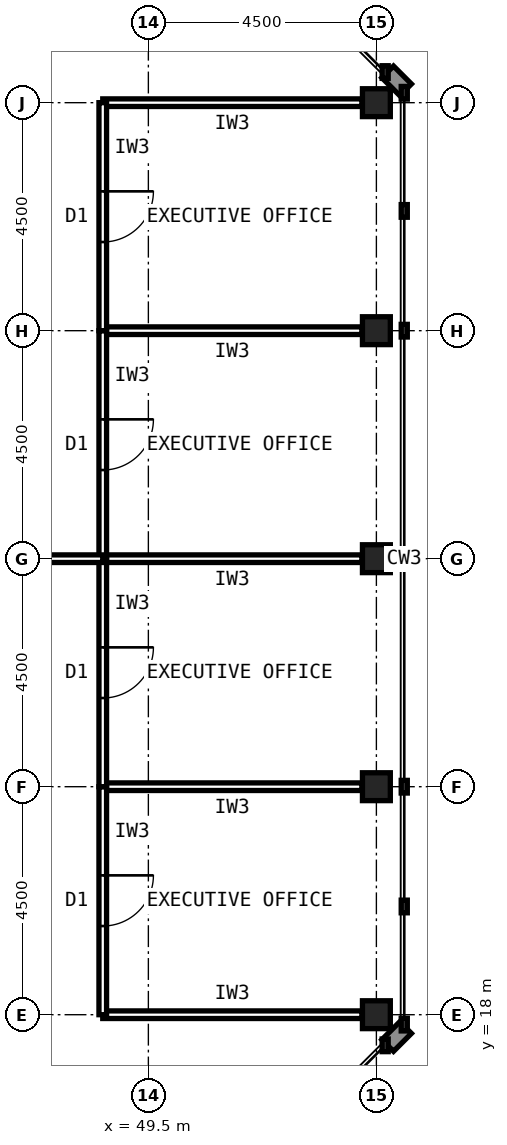
"""IFC4 building model, lengths in metres.
Left out: names, types, materials, properties, quantities, classifications, styles, units other than length and angle.
Written with IfcOpenShell. Run it as: python <this file> out.ifc"""

import sys

from ifc_helpers import new_model, si_unit, direction, frame, frame_2d, origin, origin_2d, place, context, subcontext, project, spatial, rectangle, hollow_rectangle, extrude, element, fill, save


model = new_model("IFC4")
c1 = context("Model", 3, precision=1e-05, world=origin(), true_north=direction((0.0, 1.0)))
c2 = subcontext(c1, "Body", "Model", "MODEL_VIEW")
j1 = project(units=[si_unit("LENGTHUNIT", "METRE"), si_unit("PLANEANGLEUNIT", "RADIAN")], contexts=[c1])
p1 = place(None, origin())
s1 = spatial("IfcSite", under=j1, at=p1, CompositionType="ELEMENT")
p2 = place(p1, origin())
s2 = spatial("IfcBuilding", under=s1, at=p2, CompositionType="ELEMENT")
p3 = place(p2, frame((0.0, 0.0, 294.6)))
s3 = spatial("IfcBuildingStorey", under=s2, at=p3, CompositionType="ELEMENT", Elevation=294.6)
for number, where, z_axis, x_axis in (
    (1, (54.0, 18.0, 0.0), (0.0, 0.0, 1.0), (1.0, 0.0, 0.0)),
    (2, (54.0, 22.5, 0.0), (0.0, 0.0, 1.0), (1.0, 0.0, 0.0)),
    (3, (54.0, 27.0, 0.0), (0.0, 0.0, 1.0), (1.0, 0.0, 0.0)),
    (4, (54.0, 31.5, 0.0), (0.0, 0.0, 1.0), (1.0, 0.0, 0.0)),
    (5, (54.0, 36.0, 0.0), (0.0, 0.0, 1.0), (1.0, 0.0, 0.0)),
):
    element("IfcColumn", number, at=place(p3, frame(where, z_axis=z_axis, x_axis=x_axis)), inside=s3, PredefinedType="COLUMN", context=c2, shape_type="SweptSolid", body=[
        extrude(hollow_rectangle(XDim=0.55, YDim=0.55, WallThickness=0.025, at=origin_2d()), origin(), (0.0, 0.0, 1.0), 4.0),
    ])
for number, where, z_axis, x_axis in (
    (6, (48.6, 18.0, 0.0), (0.0, 0.0, 1.0), (1.0, 0.0, 0.0)),
    (7, (53.715, 22.5, 0.0), (0.0, 0.0, 1.0), (-1.0, 0.0, 0.0)),
):
    element("IfcWall", number, at=place(p3, frame(where, z_axis=z_axis, x_axis=x_axis)), inside=s3, PredefinedType="PARTITIONING", context=c2, shape_type="SweptSolid", body=[
        extrude(rectangle(XDim=5.115, YDim=0.15, at=frame_2d((2.558, 0.0))), origin(), (0.0, 0.0, 1.0), 2.989),
    ])
p4 = place(p3, frame((48.6, 22.5, 0.0), z_axis=(0.0, 0.0, 1.0), x_axis=(0.0, -1.0, 0.0)))
e8 = element("IfcWall", 8, at=p4, inside=s3, PredefinedType="PARTITIONING", context=c2, shape_type="SweptSolid", body=[
    extrude(rectangle(XDim=4.5, YDim=0.15, at=frame_2d((2.25, 0.0))), origin(), (0.0, 0.0, 1.0), 3.84),
])
p5 = place(p4, frame((1.75, 0.0, 0.0)))
e9 = element("IfcOpeningElement", 9, at=p5, cuts=e8, PredefinedType="OPENING", context=c2, shape_type="SweptSolid", body=[
    extrude(rectangle(XDim=1.0, YDim=2.1, at=frame_2d((0.5, 1.05))), frame((0.0, 0.085, 0.0), z_axis=(0.0, -1.0, 0.0), x_axis=(1.0, 0.0, 0.0)), (0.0, 0.0, 1.0), 0.17),
])
p6 = place(p3, frame((53.715, 27.0, 0.0), z_axis=(0.0, 0.0, 1.0), x_axis=(-1.0, 0.0, 0.0)))
e10 = element("IfcWall", 10, at=p6, inside=s3, PredefinedType="PARTITIONING", context=c2, shape_type="SweptSolid", body=[
    extrude(rectangle(XDim=5.115, YDim=0.15, at=frame_2d((2.558, 0.0))), origin(), (0.0, 0.0, 1.0), 2.989),
])
p7 = place(p3, frame((48.6, 27.0, 0.0), z_axis=(0.0, 0.0, 1.0), x_axis=(0.0, -1.0, 0.0)))
e11 = element("IfcWall", 11, at=p7, inside=s3, PredefinedType="PARTITIONING", context=c2, shape_type="SweptSolid", body=[
    extrude(rectangle(XDim=4.5, YDim=0.15, at=frame_2d((2.25, 0.0))), origin(), (0.0, 0.0, 1.0), 3.84),
])
p8 = place(p7, frame((1.75, 0.0, 0.0)))
e12 = element("IfcOpeningElement", 12, at=p8, cuts=e11, PredefinedType="OPENING", context=c2, shape_type="SweptSolid", body=[
    extrude(rectangle(XDim=1.0, YDim=2.1, at=frame_2d((0.5, 1.05))), frame((0.0, 0.085, 0.0), z_axis=(0.0, -1.0, 0.0), x_axis=(1.0, 0.0, 0.0)), (0.0, 0.0, 1.0), 0.17),
])
p9 = place(p3, frame((53.715, 31.5, 0.0), z_axis=(0.0, 0.0, 1.0), x_axis=(-1.0, 0.0, 0.0)))
e13 = element("IfcWall", 13, at=p9, inside=s3, PredefinedType="PARTITIONING", context=c2, shape_type="SweptSolid", body=[
    extrude(rectangle(XDim=5.115, YDim=0.15, at=frame_2d((2.558, 0.0))), origin(), (0.0, 0.0, 1.0), 2.989),
])
p10 = place(p3, frame((48.6, 31.5, 0.0), z_axis=(0.0, 0.0, 1.0), x_axis=(0.0, -1.0, 0.0)))
e14 = element("IfcWall", 14, at=p10, inside=s3, PredefinedType="PARTITIONING", context=c2, shape_type="SweptSolid", body=[
    extrude(rectangle(XDim=4.5, YDim=0.15, at=frame_2d((2.25, 0.0))), origin(), (0.0, 0.0, 1.0), 3.84),
])
p11 = place(p10, frame((1.75, 0.0, 0.0)))
e15 = element("IfcOpeningElement", 15, at=p11, cuts=e14, PredefinedType="OPENING", context=c2, shape_type="SweptSolid", body=[
    extrude(rectangle(XDim=1.0, YDim=2.1, at=frame_2d((0.5, 1.05))), frame((0.0, 0.085, 0.0), z_axis=(0.0, -1.0, 0.0), x_axis=(1.0, 0.0, 0.0)), (0.0, 0.0, 1.0), 0.17),
])
p12 = place(p3, frame((53.715, 36.0, 0.0), z_axis=(0.0, 0.0, 1.0), x_axis=(-1.0, 0.0, 0.0)))
e16 = element("IfcWall", 16, at=p12, inside=s3, PredefinedType="PARTITIONING", context=c2, shape_type="SweptSolid", body=[
    extrude(rectangle(XDim=5.115, YDim=0.15, at=frame_2d((2.558, 0.0))), origin(), (0.0, 0.0, 1.0), 2.989),
])
p13 = place(p3, frame((48.6, 36.0, 0.0), z_axis=(0.0, 0.0, 1.0), x_axis=(0.0, -1.0, 0.0)))
e17 = element("IfcWall", 17, at=p13, inside=s3, PredefinedType="PARTITIONING", context=c2, shape_type="SweptSolid", body=[
    extrude(rectangle(XDim=4.5, YDim=0.15, at=frame_2d((2.25, 0.0))), origin(), (0.0, 0.0, 1.0), 3.84),
])
p14 = place(p13, frame((1.75, 0.0, 0.0)))
e18 = element("IfcOpeningElement", 18, at=p14, cuts=e17, PredefinedType="OPENING", context=c2, shape_type="SweptSolid", body=[
    extrude(rectangle(XDim=1.0, YDim=2.1, at=frame_2d((0.5, 1.05))), frame((0.0, 0.085, 0.0), z_axis=(0.0, -1.0, 0.0), x_axis=(1.0, 0.0, 0.0)), (0.0, 0.0, 1.0), 0.17),
])
p15 = place(p3, frame((42.3, 27.0, 0.0), z_axis=(0.0, 0.0, 1.0), x_axis=(1.0, 0.0, 0.0)))
e19 = element("IfcWall", 19, at=p15, inside=s3, PredefinedType="PARTITIONING", context=c2, shape_type="SweptSolid", body=[
    extrude(rectangle(XDim=6.3, YDim=0.15, at=frame_2d((3.15, 0.0))), origin(), (0.0, 0.0, 1.0), 2.989),
])
p16 = place(p15, frame((2.65, 0.0, 0.0)))
e20 = element("IfcOpeningElement", 20, at=p16, cuts=e19, PredefinedType="OPENING", context=c2, shape_type="SweptSolid", body=[
    extrude(rectangle(XDim=1.0, YDim=2.1, at=frame_2d((0.5, 1.05))), frame((0.0, 0.085, 0.0), z_axis=(0.0, -1.0, 0.0), x_axis=(1.0, 0.0, 0.0)), (0.0, 0.0, 1.0), 0.17),
])
p17 = place(p5, origin())
e21 = element("IfcDoor", 21, at=p17, inside=s3, OperationType="SINGLE_SWING_LEFT", PredefinedType="DOOR", context=c2, shape_type="SweptSolid", body=[
    extrude(rectangle(XDim=1.0, YDim=2.1, at=frame_2d((0.5, 1.05))), frame((0.0, 0.025, 0.0), z_axis=(0.0, -1.0, 0.0), x_axis=(1.0, 0.0, 0.0)), (0.0, 0.0, 1.0), 0.05),
])
fill(e9, e21)
p18 = place(p8, origin())
e22 = element("IfcDoor", 22, at=p18, inside=s3, OperationType="SINGLE_SWING_LEFT", PredefinedType="DOOR", context=c2, shape_type="SweptSolid", body=[
    extrude(rectangle(XDim=1.0, YDim=2.1, at=frame_2d((0.5, 1.05))), frame((0.0, 0.025, 0.0), z_axis=(0.0, -1.0, 0.0), x_axis=(1.0, 0.0, 0.0)), (0.0, 0.0, 1.0), 0.05),
])
fill(e12, e22)
p19 = place(p11, origin())
e23 = element("IfcDoor", 23, at=p19, inside=s3, OperationType="SINGLE_SWING_LEFT", PredefinedType="DOOR", context=c2, shape_type="SweptSolid", body=[
    extrude(rectangle(XDim=1.0, YDim=2.1, at=frame_2d((0.5, 1.05))), frame((0.0, 0.025, 0.0), z_axis=(0.0, -1.0, 0.0), x_axis=(1.0, 0.0, 0.0)), (0.0, 0.0, 1.0), 0.05),
])
fill(e15, e23)
p20 = place(p14, origin())
e24 = element("IfcDoor", 24, at=p20, inside=s3, OperationType="SINGLE_SWING_LEFT", PredefinedType="DOOR", context=c2, shape_type="SweptSolid", body=[
    extrude(rectangle(XDim=1.0, YDim=2.1, at=frame_2d((0.5, 1.05))), frame((0.0, 0.025, 0.0), z_axis=(0.0, -1.0, 0.0), x_axis=(1.0, 0.0, 0.0)), (0.0, 0.0, 1.0), 0.05),
])
fill(e18, e24)
save(model, sys.argv[1])
